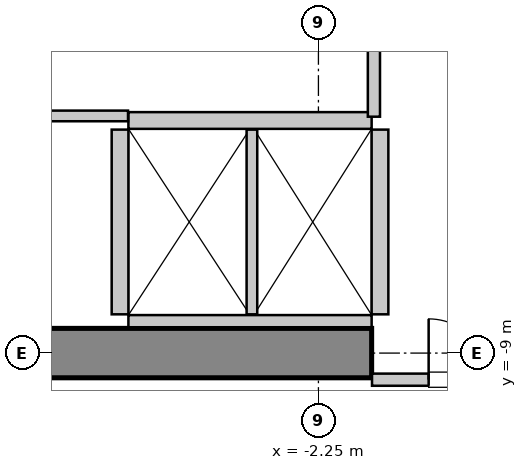
"""IFC4 building model, lengths in metres.
Left out: names, types, materials, properties, quantities, classifications, styles, units other than length and angle.
Written with IfcOpenShell. Run it as: python <this file> out.ifc"""

import sys

from ifc_helpers import new_model, si_unit, direction, frame, frame_2d, origin, place, context, subcontext, project, spatial, rectangle, extrude, source, transform, mapped, element, fill, save


model = new_model("IFC4")
c1 = context("Model", 3, precision=1e-05, world=origin(), true_north=direction((0.0, 1.0)))
c2 = subcontext(c1, "Body", "Model", "MODEL_VIEW")
j1 = project(units=[si_unit("LENGTHUNIT", "METRE"), si_unit("PLANEANGLEUNIT", "RADIAN")], contexts=[c1])
p1 = place(None, origin())
s1 = spatial("IfcSite", under=j1, at=p1, CompositionType="ELEMENT")
p2 = place(p1, origin())
s2 = spatial("IfcBuilding", under=s1, at=p2, CompositionType="ELEMENT")
p3 = place(p2, frame((0.0, 0.0, 48.2)))
s3 = spatial("IfcBuildingStorey", under=s2, at=p3, CompositionType="ELEMENT", Elevation=48.2)
m1 = source(origin(), c2, "Body", "SweptSolid", [
    extrude(rectangle(XDim=10.025, YDim=0.65, at=frame_2d((5.012, 0.0))), origin(), (0.0, 0.0, 1.0), 3.8),
])
p4 = place(p3, frame((-11.575, -9.0, 0.0), z_axis=(0.0, 0.0, 1.0), x_axis=(1.0, 0.0, 0.0)))
e1 = element("IfcWall", 1, at=p4, inside=s3, PredefinedType="SHEAR", context=c2, shape_type="MappedRepresentation", body=[
    mapped(m1, transform((0.0, 0.0, 0.0), x_axis=(1.0, 0.0, 0.0), y_axis=(0.0, 1.0, 0.0), z_axis=(0.0, 0.0, 1.0), scale=1.0)),
])
m2 = source(origin(), c2, "Body", "SweptSolid", [
    extrude(rectangle(XDim=3.2, YDim=0.22, at=frame_2d((1.6, 0.0))), origin(), (0.0, 0.0, 1.0), 3.535),
])
p5 = place(p3, frame((-1.55, -5.94, 0.0), z_axis=(0.0, 0.0, 1.0), x_axis=(-1.0, 0.0, 0.0)))
e2 = element("IfcWall", 2, at=p5, inside=s3, PredefinedType="SOLIDWALL", context=c2, shape_type="MappedRepresentation", body=[
    mapped(m2, transform((0.0, 0.0, 0.0), x_axis=(1.0, 0.0, 0.0), y_axis=(0.0, 1.0, 0.0), z_axis=(0.0, 0.0, 1.0), scale=1.0)),
])
m3 = source(origin(), c2, "Body", "SweptSolid", [
    extrude(rectangle(XDim=3.2, YDim=0.16, at=frame_2d((1.6, 0.0))), origin(), (0.0, 0.0, 1.0), 2.425),
])
p6 = place(p3, frame((-4.75, -8.58, 0.0), z_axis=(0.0, 0.0, 1.0), x_axis=(1.0, 0.0, 0.0)))
e3 = element("IfcWall", 3, at=p6, inside=s3, PredefinedType="PARTITIONING", context=c2, shape_type="MappedRepresentation", body=[
    mapped(m3, transform((0.0, 0.0, 0.0), x_axis=(1.0, 0.0, 0.0), y_axis=(0.0, 1.0, 0.0), z_axis=(0.0, 0.0, 1.0), scale=1.0)),
])
m4 = source(origin(), c2, "Body", "SweptSolid", [
    extrude(rectangle(XDim=2.43, YDim=0.22, at=frame_2d((1.215, 0.0))), origin(), (0.0, 0.0, 1.0), 3.535),
])
p7 = place(p3, frame((-4.86, -6.06, 0.0), z_axis=(0.0, 0.0, 1.0), x_axis=(0.0, -1.0, 0.0)))
e4 = element("IfcWall", 4, at=p7, inside=s3, PredefinedType="SOLIDWALL", context=c2, shape_type="MappedRepresentation", body=[
    mapped(m4, transform((0.0, 0.0, 0.0), x_axis=(1.0, 0.0, 0.0), y_axis=(0.0, 1.0, 0.0), z_axis=(0.0, 0.0, 1.0), scale=1.0)),
])
m5 = source(origin(), c2, "Body", "SweptSolid", [
    extrude(rectangle(XDim=2.43, YDim=0.14, at=frame_2d((1.215, 0.0))), origin(), (0.0, 0.0, 1.0), 3.535),
])
p8 = place(p3, frame((-3.125, -8.49, 0.0), z_axis=(0.0, 0.0, 1.0), x_axis=(0.0, 1.0, 0.0)))
e5 = element("IfcWall", 5, at=p8, inside=s3, PredefinedType="PARTITIONING", context=c2, shape_type="MappedRepresentation", body=[
    mapped(m5, transform((0.0, 0.0, 0.0), x_axis=(1.0, 0.0, 0.0), y_axis=(0.0, 1.0, 0.0), z_axis=(0.0, 0.0, 1.0), scale=1.0)),
])
p9 = place(p3, frame((-1.44, -8.49, 0.0), z_axis=(0.0, 0.0, 1.0), x_axis=(0.0, 1.0, 0.0)))
e6 = element("IfcWall", 6, at=p9, inside=s3, PredefinedType="SOLIDWALL", context=c2, shape_type="MappedRepresentation", body=[
    mapped(m4, transform((0.0, 0.0, 0.0), x_axis=(1.0, 0.0, 0.0), y_axis=(0.0, 1.0, 0.0), z_axis=(0.0, 0.0, 1.0), scale=1.0)),
])
m6 = source(origin(), c2, "Body", "SweptSolid", [
    extrude(rectangle(XDim=3.09, YDim=0.16, at=frame_2d((1.545, 0.0))), origin(), (0.0, 0.0, 1.0), 2.425),
])
p10 = place(p3, frame((-1.545, -9.35, 0.0), z_axis=(0.0, 0.0, 1.0), x_axis=(1.0, 0.0, 0.0)))
e7 = element("IfcWall", 7, at=p10, inside=s3, PredefinedType="PARTITIONING", context=c2, shape_type="MappedRepresentation", body=[
    mapped(m6, transform((0.0, 0.0, 0.0), x_axis=(1.0, 0.0, 0.0), y_axis=(0.0, 1.0, 0.0), z_axis=(0.0, 0.0, 1.0), scale=1.0)),
])
p11 = place(p10, frame((0.745, 0.0, 0.0)))
e8 = element("IfcOpeningElement", 8, at=p11, cuts=e7, PredefinedType="OPENING", context=c2, shape_type="SweptSolid", body=[
    extrude(rectangle(XDim=1.6, YDim=2.3, at=frame_2d((0.8, 1.15))), frame((0.0, 0.09, 0.0), z_axis=(0.0, -1.0, 0.0), x_axis=(1.0, 0.0, 0.0)), (0.0, 0.0, 1.0), 0.18),
])
m7 = source(origin(), c2, "Body", "SweptSolid", [
    extrude(rectangle(XDim=2.88, YDim=0.16, at=frame_2d((1.44, 0.0))), origin(), (0.0, 0.0, 1.0), 3.535),
])
p12 = place(p3, frame((-1.52, -5.89, 0.0), z_axis=(0.0, 0.0, 1.0), x_axis=(0.0, 1.0, 0.0)))
e9 = element("IfcWall", 9, at=p12, inside=s3, PredefinedType="PARTITIONING", context=c2, shape_type="MappedRepresentation", body=[
    mapped(m7, transform((0.0, 0.0, 0.0), x_axis=(1.0, 0.0, 0.0), y_axis=(0.0, 1.0, 0.0), z_axis=(0.0, 0.0, 1.0), scale=1.0)),
])
p13 = place(p12, frame((1.015, 0.0, 0.0)))
e10 = element("IfcOpeningElement", 10, at=p13, cuts=e9, PredefinedType="OPENING", context=c2, shape_type="SweptSolid", body=[
    extrude(rectangle(XDim=0.85, YDim=2.1, at=frame_2d((0.425, 1.05))), frame((0.0, 0.09, 0.0), z_axis=(0.0, -1.0, 0.0), x_axis=(1.0, 0.0, 0.0)), (0.0, 0.0, 1.0), 0.18),
])
m8 = source(origin(), c2, "Body", "SweptSolid", [
    extrude(rectangle(XDim=2.435, YDim=0.14, at=frame_2d((1.218, 0.0))), origin(), (0.0, 0.0, 1.0), 3.535),
])
p14 = place(p3, frame((-7.19, -5.88, 0.0), z_axis=(0.0, 0.0, 1.0), x_axis=(1.0, 0.0, 0.0)))
e11 = element("IfcWall", 11, at=p14, inside=s3, PredefinedType="PARTITIONING", context=c2, shape_type="MappedRepresentation", body=[
    mapped(m8, transform((0.0, 0.0, 0.0), x_axis=(1.0, 0.0, 0.0), y_axis=(0.0, 1.0, 0.0), z_axis=(0.0, 0.0, 1.0), scale=1.0)),
])
m9 = source(origin(), c2, "Body", "SweptSolid", [
    extrude(rectangle(XDim=1.6, YDim=2.3, at=frame_2d((0.8, 1.15))), frame((0.0, 0.025, 0.0), z_axis=(0.0, -1.0, 0.0), x_axis=(1.0, 0.0, 0.0)), (0.0, 0.0, 1.0), 0.05),
])
p15 = place(p11, origin())
e12 = element("IfcDoor", 12, at=p15, inside=s3, OperationType="DOUBLE_DOOR_SINGLE_SWING", PredefinedType="DOOR", context=c2, shape_type="MappedRepresentation", body=[
    mapped(m9, transform((0.0, 0.0, 0.0), x_axis=(1.0, 0.0, 0.0), y_axis=(0.0, 1.0, 0.0), z_axis=(0.0, 0.0, 1.0), scale=1.0)),
])
fill(e8, e12)
save(model, sys.argv[1])
